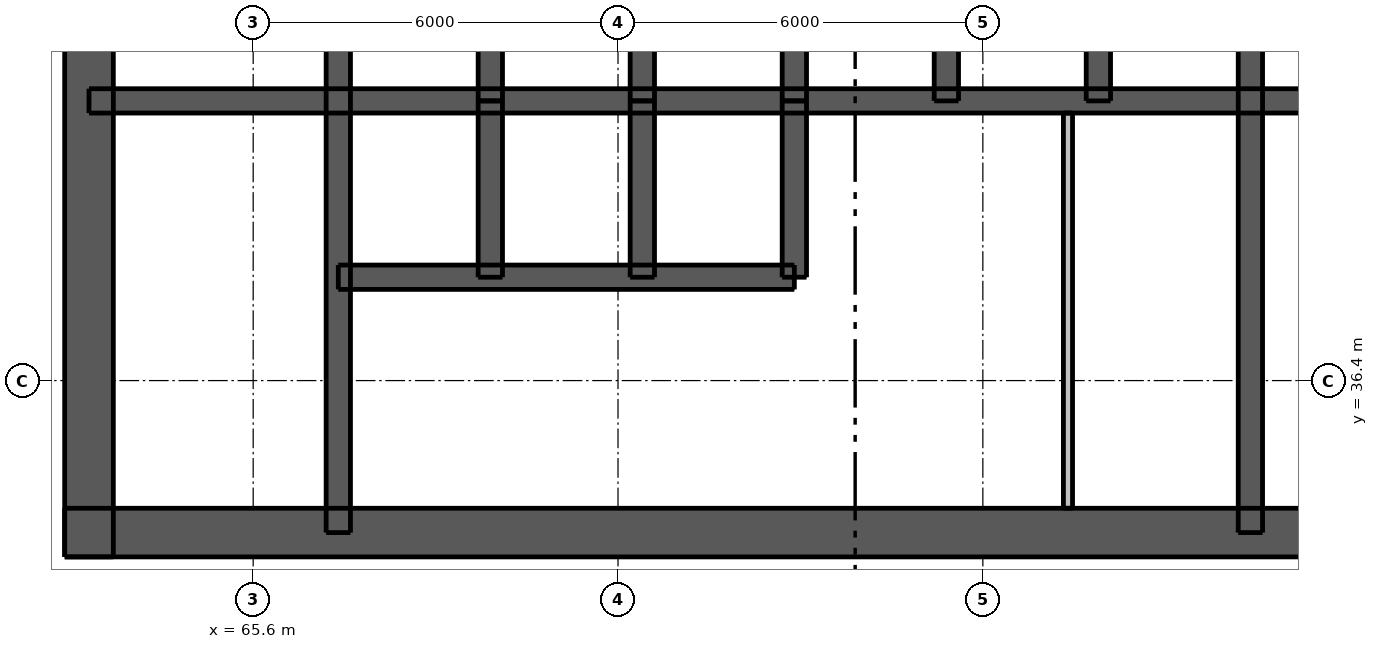
"""IFC4 building model, lengths in metres.
Left out: names, types, materials, properties, quantities, classifications, styles, units other than length and angle.
Written with IfcOpenShell. Run it as: python <this file> out.ifc"""

import sys

from ifc_helpers import new_model, si_unit, direction, frame, frame_2d, origin, place, context, subcontext, project, spatial, rectangle, extrude, element, fill, save


model = new_model("IFC4")
c1 = context("Model", 3, precision=1e-05, world=origin(), true_north=direction((0.0, 1.0)))
c2 = subcontext(c1, "Body", "Model", "MODEL_VIEW")
j1 = project(units=[si_unit("LENGTHUNIT", "METRE"), si_unit("PLANEANGLEUNIT", "RADIAN")], contexts=[c1])
p1 = place(None, origin())
s1 = spatial("IfcSite", under=j1, at=p1, CompositionType="ELEMENT")
p2 = place(p1, origin())
s2 = spatial("IfcBuilding", under=s1, at=p2, CompositionType="ELEMENT")
p3 = place(p2, frame((0.0, 0.0, 121.6)))
s3 = spatial("IfcBuildingStorey", under=s2, at=p3, CompositionType="ELEMENT", Elevation=121.6)
p4 = place(p3, frame((62.5, 33.9, 0.0), z_axis=(0.0, 0.0, 1.0), x_axis=(1.0, 0.0, 0.0)))
e1 = element("IfcWall", 1, at=p4, inside=s3, PredefinedType="SHEAR", context=c2, shape_type="SweptSolid", body=[
    extrude(rectangle(XDim=24.0, YDim=0.8, at=frame_2d((12.0, 0.0))), origin(), (0.0, 0.0, 1.0), 2.95),
])
p5 = place(p4, frame((2.0, 0.0, 0.0)))
e2 = element("IfcOpeningElement", 2, at=p5, cuts=e1, PredefinedType="OPENING", context=c2, shape_type="SweptSolid", body=[
    extrude(rectangle(XDim=1.1, YDim=2.1, at=frame_2d((0.55, 1.05))), frame((0.0, 0.41, 0.0), z_axis=(0.0, -1.0, 0.0), x_axis=(1.0, 0.0, 0.0)), (0.0, 0.0, 1.0), 0.82),
])
p6 = place(p4, frame((20.9, 0.0, 0.0)))
e3 = element("IfcOpeningElement", 3, at=p6, cuts=e1, PredefinedType="OPENING", context=c2, shape_type="SweptSolid", body=[
    extrude(rectangle(XDim=1.1, YDim=2.1, at=frame_2d((0.55, 1.05))), frame((0.0, 0.41, 0.0), z_axis=(0.0, -1.0, 0.0), x_axis=(1.0, 0.0, 0.0)), (0.0, 0.0, 1.0), 0.82),
])
p7 = place(p4, frame((8.0, 0.0, 0.0)))
e4 = element("IfcOpeningElement", 4, at=p7, cuts=e1, PredefinedType="OPENING", context=c2, shape_type="SweptSolid", body=[
    extrude(rectangle(XDim=1.1, YDim=2.1, at=frame_2d((0.55, 1.05))), frame((0.0, 0.41, 0.0), z_axis=(0.0, -1.0, 0.0), x_axis=(1.0, 0.0, 0.0)), (0.0, 0.0, 1.0), 0.82),
])
p8 = place(p4, frame((17.488, 0.0, 0.0)))
e5 = element("IfcOpeningElement", 5, at=p8, cuts=e1, PredefinedType="OPENING", context=c2, shape_type="SweptSolid", body=[
    extrude(rectangle(XDim=0.9, YDim=2.1, at=frame_2d((0.45, 1.05))), frame((0.0, 0.41, 0.0), z_axis=(0.0, -1.0, 0.0), x_axis=(1.0, 0.0, 0.0)), (0.0, 0.0, 1.0), 0.82),
])
p9 = place(p3, frame((62.9, 33.5, 0.0), z_axis=(0.0, 0.0, 1.0), x_axis=(0.0, 1.0, 0.0)))
e6 = element("IfcWall", 6, at=p9, inside=s3, PredefinedType="SHEAR", context=c2, shape_type="SweptSolid", body=[
    extrude(rectangle(XDim=24.0, YDim=0.8, at=frame_2d((12.0, 0.0))), origin(), (0.0, 0.0, 1.0), 2.95),
])
p10 = place(p9, frame((11.2, 0.0, 0.0)))
e7 = element("IfcOpeningElement", 7, at=p10, cuts=e6, PredefinedType="OPENING", context=c2, shape_type="SweptSolid", body=[
    extrude(rectangle(XDim=1.6, YDim=2.1, at=frame_2d((0.8, 1.05))), frame((0.0, 0.41, 0.0), z_axis=(0.0, -1.0, 0.0), x_axis=(1.0, 0.0, 0.0)), (0.0, 0.0, 1.0), 0.82),
])
p11 = place(p3, frame((62.9, 41.0, 0.0), z_axis=(0.0, 0.0, 1.0), x_axis=(1.0, 0.0, 0.0)))
e8 = element("IfcWall", 8, at=p11, inside=s3, PredefinedType="SHEAR", context=c2, shape_type="SweptSolid", body=[
    extrude(rectangle(XDim=23.2, YDim=0.4, at=frame_2d((11.6, 0.0))), origin(), (0.0, 0.0, 1.0), 2.95),
])
p12 = place(p3, frame((67.0, 33.9, 0.0), z_axis=(0.0, 0.0, 1.0), x_axis=(0.0, 1.0, 0.0)))
e9 = element("IfcWall", 9, at=p12, inside=s3, PredefinedType="SHEAR", context=c2, shape_type="SweptSolid", body=[
    extrude(rectangle(XDim=10.0, YDim=0.4, at=frame_2d((5.0, 0.0))), origin(), (0.0, 0.0, 1.0), 2.95),
])
p13 = place(p12, frame((0.6, 0.0, 0.0)))
e10 = element("IfcOpeningElement", 10, at=p13, cuts=e9, PredefinedType="OPENING", context=c2, shape_type="SweptSolid", body=[
    extrude(rectangle(XDim=1.1, YDim=2.1, at=frame_2d((0.55, 1.05))), frame((0.0, 0.21, 0.0), z_axis=(0.0, -1.0, 0.0), x_axis=(1.0, 0.0, 0.0)), (0.0, 0.0, 1.0), 0.42),
])
p14 = place(p3, frame((82.0, 33.9, 0.0), z_axis=(0.0, 0.0, 1.0), x_axis=(0.0, 1.0, 0.0)))
e11 = element("IfcWall", 11, at=p14, inside=s3, PredefinedType="SHEAR", context=c2, shape_type="SweptSolid", body=[
    extrude(rectangle(XDim=10.0, YDim=0.4, at=frame_2d((5.0, 0.0))), origin(), (0.0, 0.0, 1.0), 2.95),
])
for number, where, z_axis, x_axis in (
    (12, (69.5, 41.0, 0.0), (0.0, 0.0, 1.0), (0.0, 1.0, 0.0)),
    (13, (72.0, 41.0, 0.0), (0.0, 0.0, 1.0), (0.0, 1.0, 0.0)),
    (14, (74.5, 41.0, 0.0), (0.0, 0.0, 1.0), (0.0, 1.0, 0.0)),
    (15, (77.0, 41.0, 0.0), (0.0, 0.0, 1.0), (0.0, 1.0, 0.0)),
    (16, (79.5, 41.0, 0.0), (0.0, 0.0, 1.0), (0.0, 1.0, 0.0)),
):
    element("IfcWall", number, at=place(p3, frame(where, z_axis=z_axis, x_axis=x_axis)), inside=s3, PredefinedType="SHEAR", context=c2, shape_type="SweptSolid", body=[
        extrude(rectangle(XDim=2.9, YDim=0.4, at=frame_2d((1.45, 0.0))), origin(), (0.0, 0.0, 1.0), 2.95),
    ])
p15 = place(p3, frame((67.0, 38.1, 0.0), z_axis=(0.0, 0.0, 1.0), x_axis=(1.0, 0.0, 0.0)))
e17 = element("IfcWall", 17, at=p15, inside=s3, PredefinedType="SHEAR", context=c2, shape_type="SweptSolid", body=[
    extrude(rectangle(XDim=7.5, YDim=0.4, at=frame_2d((3.75, 0.0))), origin(), (0.0, 0.0, 1.0), 2.95),
])
p16 = place(p15, frame((0.7, 0.0, 0.0)))
e18 = element("IfcOpeningElement", 18, at=p16, cuts=e17, PredefinedType="OPENING", context=c2, shape_type="SweptSolid", body=[
    extrude(rectangle(XDim=1.1, YDim=2.1, at=frame_2d((0.55, 1.05))), frame((0.0, 0.21, 0.0), z_axis=(0.0, -1.0, 0.0), x_axis=(1.0, 0.0, 0.0)), (0.0, 0.0, 1.0), 0.42),
])
p17 = place(p15, frame((3.2, 0.0, 0.0)))
e19 = element("IfcOpeningElement", 19, at=p17, cuts=e17, PredefinedType="OPENING", context=c2, shape_type="SweptSolid", body=[
    extrude(rectangle(XDim=1.1, YDim=2.1, at=frame_2d((0.55, 1.05))), frame((0.0, 0.21, 0.0), z_axis=(0.0, -1.0, 0.0), x_axis=(1.0, 0.0, 0.0)), (0.0, 0.0, 1.0), 0.42),
])
p18 = place(p15, frame((5.65, 0.0, 0.0)))
e20 = element("IfcOpeningElement", 20, at=p18, cuts=e17, PredefinedType="OPENING", context=c2, shape_type="SweptSolid", body=[
    extrude(rectangle(XDim=1.2, YDim=2.1, at=frame_2d((0.6, 1.05))), frame((0.0, 0.21, 0.0), z_axis=(0.0, -1.0, 0.0), x_axis=(1.0, 0.0, 0.0)), (0.0, 0.0, 1.0), 0.42),
])
for number, where, z_axis, x_axis in (
    (21, (69.5, 38.1, 0.0), (0.0, 0.0, 1.0), (0.0, 1.0, 0.0)),
    (22, (72.0, 38.1, 0.0), (0.0, 0.0, 1.0), (0.0, 1.0, 0.0)),
    (23, (74.5, 38.1, 0.0), (0.0, 0.0, 1.0), (0.0, 1.0, 0.0)),
):
    element("IfcWall", number, at=place(p3, frame(where, z_axis=z_axis, x_axis=x_axis)), inside=s3, PredefinedType="SHEAR", context=c2, shape_type="SweptSolid", body=[
        extrude(rectangle(XDim=2.9, YDim=0.4, at=frame_2d((1.45, 0.0))), origin(), (0.0, 0.0, 1.0), 2.95),
    ])
p19 = place(p3, frame((79.0, 34.3, 0.0), z_axis=(0.0, 0.0, 1.0), x_axis=(0.0, 1.0, 0.0)))
e24 = element("IfcWall", 24, at=p19, inside=s3, PredefinedType="PLUMBINGWALL", context=c2, shape_type="SweptSolid", body=[
    extrude(rectangle(XDim=6.5, YDim=0.15, at=frame_2d((3.25, 0.0))), origin(), (0.0, 0.0, 1.0), 2.95),
])
p20 = place(p5, origin())
e25 = element("IfcDoor", 25, at=p20, inside=s3, OperationType="SINGLE_SWING_LEFT", PredefinedType="DOOR", context=c2, shape_type="SweptSolid", body=[
    extrude(rectangle(XDim=1.1, YDim=2.1, at=frame_2d((0.55, 1.05))), frame((0.0, 0.388, 0.0), z_axis=(0.0, -1.0, 0.0), x_axis=(1.0, 0.0, 0.0)), (0.0, 0.0, 1.0), 0.05),
])
fill(e2, e25)
p21 = place(p7, origin())
e26 = element("IfcDoor", 26, at=p21, inside=s3, OperationType="SINGLE_SWING_LEFT", PredefinedType="DOOR", context=c2, shape_type="SweptSolid", body=[
    extrude(rectangle(XDim=1.1, YDim=2.1, at=frame_2d((0.55, 1.05))), frame((0.0, 0.388, 0.0), z_axis=(0.0, -1.0, 0.0), x_axis=(1.0, 0.0, 0.0)), (0.0, 0.0, 1.0), 0.05),
])
fill(e4, e26)
p22 = place(p13, origin())
e27 = element("IfcDoor", 27, at=p22, inside=s3, OperationType="SINGLE_SWING_RIGHT", PredefinedType="DOOR", context=c2, shape_type="SweptSolid", body=[
    extrude(rectangle(XDim=1.1, YDim=2.1, at=frame_2d((0.55, 1.05))), frame((0.0, -0.138, 0.0), z_axis=(0.0, -1.0, 0.0), x_axis=(1.0, 0.0, 0.0)), (0.0, 0.0, 1.0), 0.05),
])
fill(e10, e27)
p23 = place(p8, origin())
e28 = element("IfcDoor", 28, at=p23, inside=s3, OperationType="SINGLE_SWING_LEFT", PredefinedType="DOOR", context=c2, shape_type="SweptSolid", body=[
    extrude(rectangle(XDim=0.9, YDim=2.1, at=frame_2d((0.45, 1.05))), frame((0.0, 0.388, 0.0), z_axis=(0.0, -1.0, 0.0), x_axis=(1.0, 0.0, 0.0)), (0.0, 0.0, 1.0), 0.05),
])
fill(e5, e28)
p24 = place(p16, origin())
e29 = element("IfcDoor", 29, at=p24, inside=s3, OperationType="DOUBLE_DOOR_SLIDING", PredefinedType="DOOR", context=c2, shape_type="SweptSolid", body=[
    extrude(rectangle(XDim=1.1, YDim=2.1, at=frame_2d((0.55, 1.05))), frame((0.0, 0.025, 0.0), z_axis=(0.0, -1.0, 0.0), x_axis=(1.0, 0.0, 0.0)), (0.0, 0.0, 1.0), 0.05),
])
fill(e18, e29)
p25 = place(p17, origin())
e30 = element("IfcDoor", 30, at=p25, inside=s3, OperationType="DOUBLE_DOOR_SLIDING", PredefinedType="DOOR", context=c2, shape_type="SweptSolid", body=[
    extrude(rectangle(XDim=1.1, YDim=2.1, at=frame_2d((0.55, 1.05))), frame((0.0, 0.025, 0.0), z_axis=(0.0, -1.0, 0.0), x_axis=(1.0, 0.0, 0.0)), (0.0, 0.0, 1.0), 0.05),
])
fill(e19, e30)
p26 = place(p18, origin())
e31 = element("IfcDoor", 31, at=p26, inside=s3, OperationType="DOUBLE_DOOR_SLIDING", PredefinedType="DOOR", context=c2, shape_type="SweptSolid", body=[
    extrude(rectangle(XDim=1.2, YDim=2.1, at=frame_2d((0.6, 1.05))), frame((0.0, 0.025, 0.0), z_axis=(0.0, -1.0, 0.0), x_axis=(1.0, 0.0, 0.0)), (0.0, 0.0, 1.0), 0.05),
])
fill(e20, e31)
save(model, sys.argv[1])
